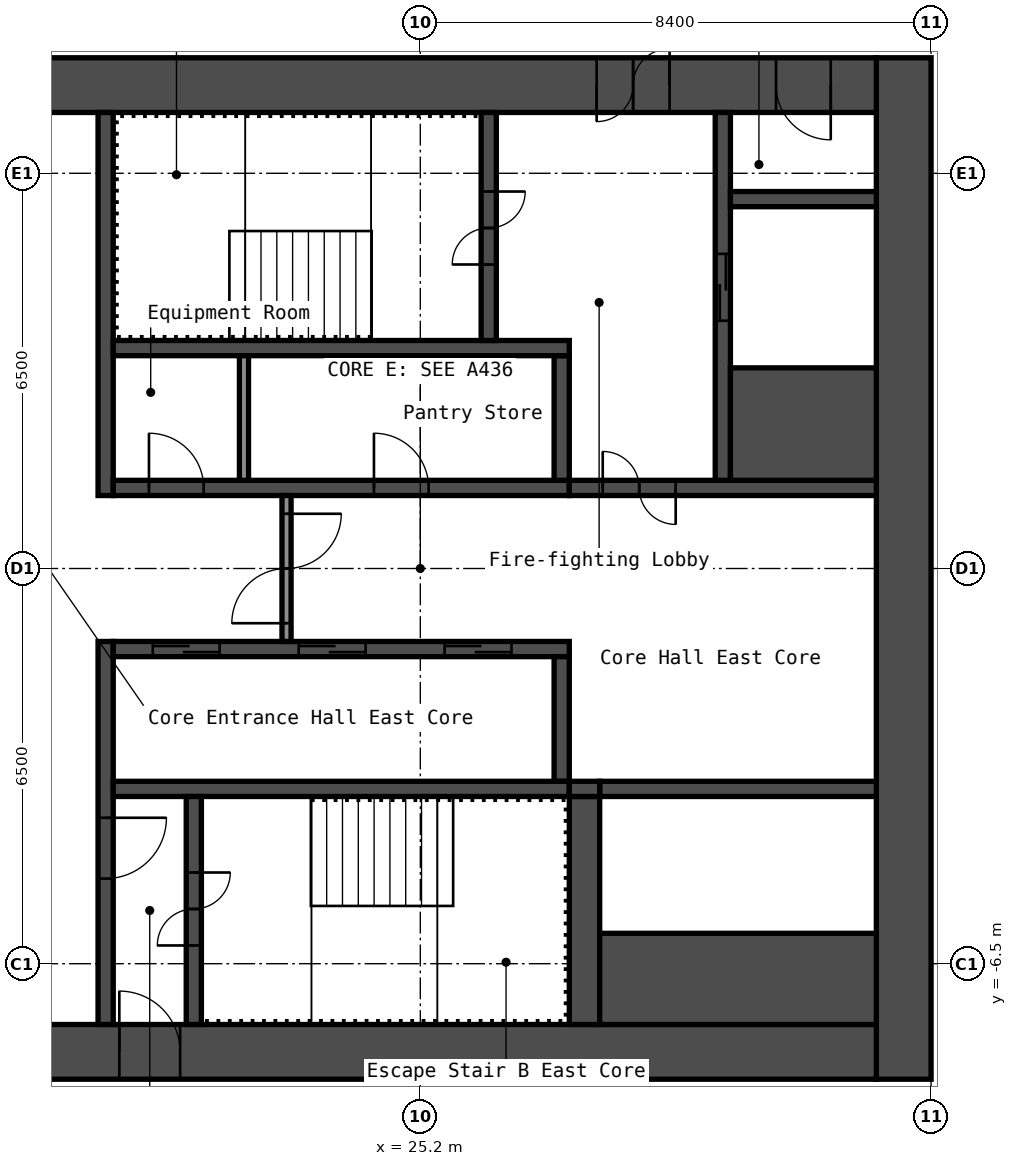
"""IFC4 building model, lengths in metres.
Left out: names, types, materials, properties, quantities, classifications, styles, units other than length and angle.
Written with IfcOpenShell. Run it as: python <this file> out.ifc"""

import sys

from ifc_helpers import new_model, si_unit, direction, frame, frame_2d, origin, place, context, subcontext, project, spatial, rectangle, extrude, element, fill, save


model = new_model("IFC4")
c1 = context("Model", 3, precision=1e-05, world=origin(), true_north=direction((0.0, 1.0)))
c2 = subcontext(c1, "Body", "Model", "MODEL_VIEW")
j1 = project(units=[si_unit("LENGTHUNIT", "METRE"), si_unit("PLANEANGLEUNIT", "RADIAN")], contexts=[c1])
p1 = place(None, origin())
s1 = spatial("IfcSite", under=j1, at=p1, CompositionType="ELEMENT")
p2 = place(p1, origin())
s2 = spatial("IfcBuilding", under=s1, at=p2, CompositionType="ELEMENT")
p3 = place(p2, frame((0.0, 0.0, 248.6)))
s3 = spatial("IfcBuildingStorey", under=s2, at=p3, CompositionType="ELEMENT", Elevation=248.6)
p4 = place(p3, frame((33.15, -8.4, 0.0), z_axis=(0.0, 0.0, 1.0), x_axis=(0.0, 1.0, 0.0)))
e1 = element("IfcWall", 1, at=p4, inside=s3, PredefinedType="SHEAR", context=c2, shape_type="SweptSolid", body=[
    extrude(rectangle(XDim=16.8, YDim=0.9, at=frame_2d((8.4, 0.0))), origin(), (0.0, 0.0, 1.0), 2.75),
])
p5 = place(p3, frame((17.7, 7.95, 0.0), z_axis=(0.0, 0.0, 1.0), x_axis=(1.0, 0.0, 0.0)))
e2 = element("IfcWall", 2, at=p5, inside=s3, PredefinedType="SHEAR", context=c2, shape_type="SweptSolid", body=[
    extrude(rectangle(XDim=15.0, YDim=0.9, at=frame_2d((7.5, 0.0))), origin(), (0.0, 0.0, 1.0), 2.75),
])
p6 = place(p5, frame((10.4, 0.0, 0.0)))
e3 = element("IfcOpeningElement", 3, at=p6, cuts=e2, PredefinedType="OPENING", context=c2, shape_type="SweptSolid", body=[
    extrude(rectangle(XDim=1.2, YDim=2.1, at=frame_2d((0.6, 1.05))), frame((0.0, 0.46, 0.0), z_axis=(0.0, -1.0, 0.0), x_axis=(1.0, 0.0, 0.0)), (0.0, 0.0, 1.0), 0.92),
])
p7 = place(p5, frame((13.35, 0.0, 0.0)))
e4 = element("IfcOpeningElement", 4, at=p7, cuts=e2, PredefinedType="OPENING", context=c2, shape_type="SweptSolid", body=[
    extrude(rectangle(XDim=0.9, YDim=2.1, at=frame_2d((0.45, 1.05))), frame((0.0, 0.46, 0.0), z_axis=(0.0, -1.0, 0.0), x_axis=(1.0, 0.0, 0.0)), (0.0, 0.0, 1.0), 0.92),
])
p8 = place(p3, frame((17.7, -7.95, 0.0), z_axis=(0.0, 0.0, 1.0), x_axis=(1.0, 0.0, 0.0)))
e5 = element("IfcWall", 5, at=p8, inside=s3, PredefinedType="SHEAR", context=c2, shape_type="SweptSolid", body=[
    extrude(rectangle(XDim=15.0, YDim=0.9, at=frame_2d((7.5, 0.0))), origin(), (0.0, 0.0, 1.0), 2.75),
])
p9 = place(p8, frame((2.55, 0.0, 0.0)))
e6 = element("IfcOpeningElement", 6, at=p9, cuts=e5, PredefinedType="OPENING", context=c2, shape_type="SweptSolid", body=[
    extrude(rectangle(XDim=1.0, YDim=2.1, at=frame_2d((0.5, 1.05))), frame((0.0, 0.46, 0.0), z_axis=(0.0, -1.0, 0.0), x_axis=(1.0, 0.0, 0.0)), (0.0, 0.0, 1.0), 0.92),
])
p10 = place(p3, frame((20.025, 1.2, 0.0), z_axis=(0.0, 0.0, 1.0), x_axis=(0.0, 1.0, 0.0)))
e7 = element("IfcWall", 7, at=p10, inside=s3, PredefinedType="SHEAR", context=c2, shape_type="SweptSolid", body=[
    extrude(rectangle(XDim=6.3, YDim=0.25, at=frame_2d((3.15, 0.0))), origin(), (0.0, 0.0, 1.0), 2.75),
])
p11 = place(p3, frame((20.025, -7.5, 0.0), z_axis=(0.0, 0.0, 1.0), x_axis=(0.0, 1.0, 0.0)))
e8 = element("IfcWall", 8, at=p11, inside=s3, PredefinedType="SHEAR", context=c2, shape_type="SweptSolid", body=[
    extrude(rectangle(XDim=6.3, YDim=0.25, at=frame_2d((3.15, 0.0))), origin(), (0.0, 0.0, 1.0), 2.75),
])
p12 = place(p11, frame((2.4, 0.0, 0.0)))
e9 = element("IfcOpeningElement", 9, at=p12, cuts=e8, PredefinedType="OPENING", context=c2, shape_type="SweptSolid", body=[
    extrude(rectangle(XDim=1.0, YDim=2.1, at=frame_2d((0.5, 1.05))), frame((0.0, 0.135, 0.0), z_axis=(0.0, -1.0, 0.0), x_axis=(1.0, 0.0, 0.0)), (0.0, 0.0, 1.0), 0.27),
])
p13 = place(p3, frame((20.15, 1.325, 0.0), z_axis=(0.0, 0.0, 1.0), x_axis=(1.0, 0.0, 0.0)))
e10 = element("IfcWall", 10, at=p13, inside=s3, PredefinedType="SHEAR", context=c2, shape_type="SweptSolid", body=[
    extrude(rectangle(XDim=7.5, YDim=0.25, at=frame_2d((3.75, 0.0))), origin(), (0.0, 0.0, 1.0), 2.75),
])
p14 = place(p13, frame((0.587, 0.0, 0.0)))
e11 = element("IfcOpeningElement", 11, at=p14, cuts=e10, PredefinedType="OPENING", context=c2, shape_type="SweptSolid", body=[
    extrude(rectangle(XDim=0.9, YDim=2.1, at=frame_2d((0.45, 1.05))), frame((0.0, 0.135, 0.0), z_axis=(0.0, -1.0, 0.0), x_axis=(1.0, 0.0, 0.0)), (0.0, 0.0, 1.0), 0.27),
])
p15 = place(p13, frame((4.288, 0.0, 0.0)))
e12 = element("IfcOpeningElement", 12, at=p15, cuts=e10, PredefinedType="OPENING", context=c2, shape_type="SweptSolid", body=[
    extrude(rectangle(XDim=0.9, YDim=2.1, at=frame_2d((0.45, 1.05))), frame((0.0, 0.135, 0.0), z_axis=(0.0, -1.0, 0.0), x_axis=(1.0, 0.0, 0.0)), (0.0, 0.0, 1.0), 0.27),
])
p16 = place(p3, frame((27.525, 1.45, 0.0), z_axis=(0.0, 0.0, 1.0), x_axis=(0.0, 1.0, 0.0)))
e13 = element("IfcWall", 13, at=p16, inside=s3, PredefinedType="SHEAR", context=c2, shape_type="SweptSolid", body=[
    extrude(rectangle(XDim=2.05, YDim=0.25, at=frame_2d((1.025, 0.0))), origin(), (0.0, 0.0, 1.0), 2.75),
])
p17 = place(p3, frame((20.15, 3.625, 0.0), z_axis=(0.0, 0.0, 1.0), x_axis=(1.0, 0.0, 0.0)))
e14 = element("IfcWall", 14, at=p17, inside=s3, PredefinedType="SHEAR", context=c2, shape_type="SweptSolid", body=[
    extrude(rectangle(XDim=7.5, YDim=0.25, at=frame_2d((3.75, 0.0))), origin(), (0.0, 0.0, 1.0), 2.75),
])
p18 = place(p3, frame((26.325, 3.75, 0.0), z_axis=(0.0, 0.0, 1.0), x_axis=(0.0, 1.0, 0.0)))
e15 = element("IfcWall", 15, at=p18, inside=s3, PredefinedType="SHEAR", context=c2, shape_type="SweptSolid", body=[
    extrude(rectangle(XDim=3.75, YDim=0.25, at=frame_2d((1.875, 0.0))), origin(), (0.0, 0.0, 1.0), 2.75),
])
p19 = place(p18, frame((1.25, 0.0, 0.0)))
e16 = element("IfcOpeningElement", 16, at=p19, cuts=e15, PredefinedType="OPENING", context=c2, shape_type="SweptSolid", body=[
    extrude(rectangle(XDim=1.2, YDim=2.1, at=frame_2d((0.6, 1.05))), frame((0.0, 0.135, 0.0), z_axis=(0.0, -1.0, 0.0), x_axis=(1.0, 0.0, 0.0)), (0.0, 0.0, 1.0), 0.27),
])
p20 = place(p3, frame((27.65, 1.325, 0.0), z_axis=(0.0, 0.0, 1.0), x_axis=(1.0, 0.0, 0.0)))
e17 = element("IfcWall", 17, at=p20, inside=s3, PredefinedType="SHEAR", context=c2, shape_type="SweptSolid", body=[
    extrude(rectangle(XDim=5.05, YDim=0.25, at=frame_2d((2.525, 0.0))), origin(), (0.0, 0.0, 1.0), 2.75),
])
p21 = place(p20, frame((0.55, 0.0, 0.0)))
e18 = element("IfcOpeningElement", 18, at=p21, cuts=e17, PredefinedType="OPENING", context=c2, shape_type="SweptSolid", body=[
    extrude(rectangle(XDim=1.2, YDim=2.1, at=frame_2d((0.6, 1.05))), frame((0.0, 0.135, 0.0), z_axis=(0.0, -1.0, 0.0), x_axis=(1.0, 0.0, 0.0)), (0.0, 0.0, 1.0), 0.27),
])
p22 = place(p3, frame((30.175, 1.45, 0.0), z_axis=(0.0, 0.0, 1.0), x_axis=(0.0, 1.0, 0.0)))
e19 = element("IfcWall", 19, at=p22, inside=s3, PredefinedType="SHEAR", context=c2, shape_type="SweptSolid", body=[
    extrude(rectangle(XDim=6.05, YDim=0.25, at=frame_2d((3.025, 0.0))), origin(), (0.0, 0.0, 1.0), 2.75),
])
p23 = place(p22, frame((2.625, 0.0, 0.0)))
e20 = element("IfcOpeningElement", 20, at=p23, cuts=e19, PredefinedType="OPENING", context=c2, shape_type="SweptSolid", body=[
    extrude(rectangle(XDim=1.1, YDim=2.1, at=frame_2d((0.55, 1.05))), frame((0.0, 0.135, 0.0), z_axis=(0.0, -1.0, 0.0), x_axis=(1.0, 0.0, 0.0)), (0.0, 0.0, 1.0), 0.27),
])
p24 = place(p3, frame((30.3, 2.375, 0.0), z_axis=(0.0, 0.0, 1.0), x_axis=(1.0, 0.0, 0.0)))
e21 = element("IfcWall", 21, at=p24, inside=s3, PredefinedType="SHEAR", context=c2, shape_type="SweptSolid", body=[
    extrude(rectangle(XDim=2.4, YDim=1.85, at=frame_2d((1.2, 0.0))), origin(), (0.0, 0.0, 1.0), 2.75),
])
p25 = place(p3, frame((30.3, 6.075, 0.0), z_axis=(0.0, 0.0, 1.0), x_axis=(1.0, 0.0, 0.0)))
e22 = element("IfcWall", 22, at=p25, inside=s3, PredefinedType="SHEAR", context=c2, shape_type="SweptSolid", body=[
    extrude(rectangle(XDim=2.4, YDim=0.25, at=frame_2d((1.2, 0.0))), origin(), (0.0, 0.0, 1.0), 2.75),
])
p26 = place(p3, frame((20.15, -1.325, 0.0), z_axis=(0.0, 0.0, 1.0), x_axis=(1.0, 0.0, 0.0)))
e23 = element("IfcWall", 23, at=p26, inside=s3, PredefinedType="SHEAR", context=c2, shape_type="SweptSolid", body=[
    extrude(rectangle(XDim=7.5, YDim=0.25, at=frame_2d((3.75, 0.0))), origin(), (0.0, 0.0, 1.0), 2.75),
])
p27 = place(p26, frame((0.65, 0.0, 0.0)))
e24 = element("IfcOpeningElement", 24, at=p27, cuts=e23, PredefinedType="OPENING", context=c2, shape_type="SweptSolid", body=[
    extrude(rectangle(XDim=1.1, YDim=2.1, at=frame_2d((0.55, 1.05))), frame((0.0, 0.135, 0.0), z_axis=(0.0, -1.0, 0.0), x_axis=(1.0, 0.0, 0.0)), (0.0, 0.0, 1.0), 0.27),
])
p28 = place(p26, frame((3.05, 0.0, 0.0)))
e25 = element("IfcOpeningElement", 25, at=p28, cuts=e23, PredefinedType="OPENING", context=c2, shape_type="SweptSolid", body=[
    extrude(rectangle(XDim=1.1, YDim=2.1, at=frame_2d((0.55, 1.05))), frame((0.0, 0.135, 0.0), z_axis=(0.0, -1.0, 0.0), x_axis=(1.0, 0.0, 0.0)), (0.0, 0.0, 1.0), 0.27),
])
p29 = place(p26, frame((5.45, 0.0, 0.0)))
e26 = element("IfcOpeningElement", 26, at=p29, cuts=e23, PredefinedType="OPENING", context=c2, shape_type="SweptSolid", body=[
    extrude(rectangle(XDim=1.1, YDim=2.1, at=frame_2d((0.55, 1.05))), frame((0.0, 0.135, 0.0), z_axis=(0.0, -1.0, 0.0), x_axis=(1.0, 0.0, 0.0)), (0.0, 0.0, 1.0), 0.27),
])
p30 = place(p3, frame((27.525, -3.5, 0.0), z_axis=(0.0, 0.0, 1.0), x_axis=(0.0, 1.0, 0.0)))
e27 = element("IfcWall", 27, at=p30, inside=s3, PredefinedType="SHEAR", context=c2, shape_type="SweptSolid", body=[
    extrude(rectangle(XDim=2.05, YDim=0.25, at=frame_2d((1.025, 0.0))), origin(), (0.0, 0.0, 1.0), 2.75),
])
p31 = place(p3, frame((20.15, -3.625, 0.0), z_axis=(0.0, 0.0, 1.0), x_axis=(1.0, 0.0, 0.0)))
e28 = element("IfcWall", 28, at=p31, inside=s3, PredefinedType="SHEAR", context=c2, shape_type="SweptSolid", body=[
    extrude(rectangle(XDim=7.5, YDim=0.25, at=frame_2d((3.75, 0.0))), origin(), (0.0, 0.0, 1.0), 2.75),
])
p32 = place(p3, frame((21.475, -7.5, 0.0), z_axis=(0.0, 0.0, 1.0), x_axis=(0.0, 1.0, 0.0)))
e29 = element("IfcWall", 29, at=p32, inside=s3, PredefinedType="SHEAR", context=c2, shape_type="SweptSolid", body=[
    extrude(rectangle(XDim=3.75, YDim=0.25, at=frame_2d((1.875, 0.0))), origin(), (0.0, 0.0, 1.0), 2.75),
])
p33 = place(p32, frame((1.3, 0.0, 0.0)))
e30 = element("IfcOpeningElement", 30, at=p33, cuts=e29, PredefinedType="OPENING", context=c2, shape_type="SweptSolid", body=[
    extrude(rectangle(XDim=1.2, YDim=2.1, at=frame_2d((0.6, 1.05))), frame((0.0, 0.135, 0.0), z_axis=(0.0, -1.0, 0.0), x_axis=(1.0, 0.0, 0.0)), (0.0, 0.0, 1.0), 0.27),
])
p34 = place(p3, frame((27.9, -7.5, 0.0), z_axis=(0.0, 0.0, 1.0), x_axis=(0.0, 1.0, 0.0)))
e31 = element("IfcWall", 31, at=p34, inside=s3, PredefinedType="SHEAR", context=c2, shape_type="SweptSolid", body=[
    extrude(rectangle(XDim=3.75, YDim=0.5, at=frame_2d((1.875, 0.0))), origin(), (0.0, 0.0, 1.0), 2.75),
])
p35 = place(p3, frame((28.15, -3.625, 0.0), z_axis=(0.0, 0.0, 1.0), x_axis=(1.0, 0.0, 0.0)))
e32 = element("IfcWall", 32, at=p35, inside=s3, PredefinedType="SHEAR", context=c2, shape_type="SweptSolid", body=[
    extrude(rectangle(XDim=4.55, YDim=0.25, at=frame_2d((2.275, 0.0))), origin(), (0.0, 0.0, 1.0), 2.75),
])
p36 = place(p3, frame((28.15, -6.75, 0.0), z_axis=(0.0, 0.0, 1.0), x_axis=(1.0, 0.0, 0.0)))
e33 = element("IfcWall", 33, at=p36, inside=s3, PredefinedType="SHEAR", context=c2, shape_type="SweptSolid", body=[
    extrude(rectangle(XDim=4.55, YDim=1.5, at=frame_2d((2.275, 0.0))), origin(), (0.0, 0.0, 1.0), 2.75),
])
p37 = place(p3, frame((27.65, -3.625, 0.0), z_axis=(0.0, 0.0, 1.0), x_axis=(1.0, 0.0, 0.0)))
e34 = element("IfcWall", 34, at=p37, inside=s3, PredefinedType="SHEAR", context=c2, shape_type="SweptSolid", body=[
    extrude(rectangle(XDim=0.5, YDim=0.25, at=frame_2d((0.25, 0.0))), origin(), (0.0, 0.0, 1.0), 2.75),
])
p38 = place(p3, frame((23.0, -1.2, 0.0), z_axis=(0.0, 0.0, 1.0), x_axis=(0.0, 1.0, 0.0)))
e35 = element("IfcWall", 35, at=p38, inside=s3, PredefinedType="PARTITIONING", context=c2, shape_type="SweptSolid", body=[
    extrude(rectangle(XDim=2.4, YDim=0.15, at=frame_2d((1.2, 0.0))), origin(), (0.0, 0.0, 1.0), 2.75),
])
p39 = place(p38, frame((0.3, 0.0, 0.0)))
e36 = element("IfcOpeningElement", 36, at=p39, cuts=e35, PredefinedType="OPENING", context=c2, shape_type="SweptSolid", body=[
    extrude(rectangle(XDim=1.8, YDim=2.1, at=frame_2d((0.9, 1.05))), frame((0.0, 0.085, 0.0), z_axis=(0.0, -1.0, 0.0), x_axis=(1.0, 0.0, 0.0)), (0.0, 0.0, 1.0), 0.17),
])
p40 = place(p3, frame((22.3, 1.45, 0.0), z_axis=(0.0, 0.0, 1.0), x_axis=(0.0, 1.0, 0.0)))
e37 = element("IfcWall", 37, at=p40, inside=s3, PredefinedType="PARTITIONING", context=c2, shape_type="SweptSolid", body=[
    extrude(rectangle(XDim=2.05, YDim=0.15, at=frame_2d((1.025, 0.0))), origin(), (0.0, 0.0, 1.0), 2.75),
])
p41 = place(p6, origin())
e38 = element("IfcDoor", 38, at=p41, inside=s3, OperationType="DOUBLE_DOOR_SINGLE_SWING", PredefinedType="DOOR", context=c2, shape_type="SweptSolid", body=[
    extrude(rectangle(XDim=1.2, YDim=2.1, at=frame_2d((0.6, 1.05))), frame((0.0, 0.025, 0.0), z_axis=(0.0, -1.0, 0.0), x_axis=(1.0, 0.0, 0.0)), (0.0, 0.0, 1.0), 0.05),
])
fill(e3, e38)
p42 = place(p7, origin())
e39 = element("IfcDoor", 39, at=p42, inside=s3, OperationType="SINGLE_SWING_RIGHT", PredefinedType="DOOR", context=c2, shape_type="SweptSolid", body=[
    extrude(rectangle(XDim=0.9, YDim=2.1, at=frame_2d((0.45, 1.05))), frame((0.0, 0.025, 0.0), z_axis=(0.0, -1.0, 0.0), x_axis=(1.0, 0.0, 0.0)), (0.0, 0.0, 1.0), 0.05),
])
fill(e4, e39)
p43 = place(p9, origin())
e40 = element("IfcDoor", 40, at=p43, inside=s3, OperationType="SINGLE_SWING_RIGHT", PredefinedType="DOOR", context=c2, shape_type="SweptSolid", body=[
    extrude(rectangle(XDim=1.0, YDim=2.1, at=frame_2d((0.5, 1.05))), frame((0.0, 0.025, 0.0), z_axis=(0.0, -1.0, 0.0), x_axis=(1.0, 0.0, 0.0)), (0.0, 0.0, 1.0), 0.05),
])
fill(e6, e40)
p44 = place(p19, origin())
e41 = element("IfcDoor", 41, at=p44, inside=s3, OperationType="DOUBLE_DOOR_SINGLE_SWING", PredefinedType="DOOR", context=c2, shape_type="SweptSolid", body=[
    extrude(rectangle(XDim=1.2, YDim=2.1, at=frame_2d((0.6, 1.05))), frame((0.0, 0.025, 0.0), z_axis=(0.0, -1.0, 0.0), x_axis=(1.0, 0.0, 0.0)), (0.0, 0.0, 1.0), 0.05),
])
fill(e16, e41)
p45 = place(p33, origin())
e42 = element("IfcDoor", 42, at=p45, inside=s3, OperationType="DOUBLE_DOOR_SINGLE_SWING", PredefinedType="DOOR", context=c2, shape_type="SweptSolid", body=[
    extrude(rectangle(XDim=1.2, YDim=2.1, at=frame_2d((0.6, 1.05))), frame((0.0, 0.025, 0.0), z_axis=(0.0, -1.0, 0.0), x_axis=(1.0, 0.0, 0.0)), (0.0, 0.0, 1.0), 0.05),
])
fill(e30, e42)
p46 = place(p12, origin())
e43 = element("IfcDoor", 43, at=p46, inside=s3, OperationType="SINGLE_SWING_RIGHT", PredefinedType="DOOR", context=c2, shape_type="SweptSolid", body=[
    extrude(rectangle(XDim=1.0, YDim=2.1, at=frame_2d((0.5, 1.05))), frame((0.0, 0.025, 0.0), z_axis=(0.0, -1.0, 0.0), x_axis=(1.0, 0.0, 0.0)), (0.0, 0.0, 1.0), 0.05),
])
fill(e9, e43)
p47 = place(p21, origin())
e44 = element("IfcDoor", 44, at=p47, inside=s3, OperationType="DOUBLE_DOOR_SINGLE_SWING", PredefinedType="DOOR", context=c2, shape_type="SweptSolid", body=[
    extrude(rectangle(XDim=1.2, YDim=2.1, at=frame_2d((0.6, 1.05))), frame((0.0, 0.025, 0.0), z_axis=(0.0, -1.0, 0.0), x_axis=(1.0, 0.0, 0.0)), (0.0, 0.0, 1.0), 0.05),
])
fill(e18, e44)
p48 = place(p39, origin())
e45 = element("IfcDoor", 45, at=p48, inside=s3, OperationType="DOUBLE_DOOR_SINGLE_SWING", PredefinedType="DOOR", context=c2, shape_type="SweptSolid", body=[
    extrude(rectangle(XDim=1.8, YDim=2.1, at=frame_2d((0.9, 1.05))), frame((0.0, 0.025, 0.0), z_axis=(0.0, -1.0, 0.0), x_axis=(1.0, 0.0, 0.0)), (0.0, 0.0, 1.0), 0.05),
])
fill(e36, e45)
p49 = place(p14, origin())
e46 = element("IfcDoor", 46, at=p49, inside=s3, OperationType="SINGLE_SWING_RIGHT", PredefinedType="DOOR", context=c2, shape_type="SweptSolid", body=[
    extrude(rectangle(XDim=0.9, YDim=2.1, at=frame_2d((0.45, 1.05))), frame((0.0, 0.025, 0.0), z_axis=(0.0, -1.0, 0.0), x_axis=(1.0, 0.0, 0.0)), (0.0, 0.0, 1.0), 0.05),
])
fill(e11, e46)
p50 = place(p15, origin())
e47 = element("IfcDoor", 47, at=p50, inside=s3, OperationType="SINGLE_SWING_RIGHT", PredefinedType="DOOR", context=c2, shape_type="SweptSolid", body=[
    extrude(rectangle(XDim=0.9, YDim=2.1, at=frame_2d((0.45, 1.05))), frame((0.0, 0.025, 0.0), z_axis=(0.0, -1.0, 0.0), x_axis=(1.0, 0.0, 0.0)), (0.0, 0.0, 1.0), 0.05),
])
fill(e12, e47)
p51 = place(p27, origin())
e48 = element("IfcDoor", 48, at=p51, inside=s3, OperationType="DOUBLE_DOOR_SLIDING", PredefinedType="DOOR", context=c2, shape_type="SweptSolid", body=[
    extrude(rectangle(XDim=1.1, YDim=2.1, at=frame_2d((0.55, 1.05))), frame((0.0, 0.025, 0.0), z_axis=(0.0, -1.0, 0.0), x_axis=(1.0, 0.0, 0.0)), (0.0, 0.0, 1.0), 0.05),
])
fill(e24, e48)
p52 = place(p28, origin())
e49 = element("IfcDoor", 49, at=p52, inside=s3, OperationType="DOUBLE_DOOR_SLIDING", PredefinedType="DOOR", context=c2, shape_type="SweptSolid", body=[
    extrude(rectangle(XDim=1.1, YDim=2.1, at=frame_2d((0.55, 1.05))), frame((0.0, 0.025, 0.0), z_axis=(0.0, -1.0, 0.0), x_axis=(1.0, 0.0, 0.0)), (0.0, 0.0, 1.0), 0.05),
])
fill(e25, e49)
p53 = place(p29, origin())
e50 = element("IfcDoor", 50, at=p53, inside=s3, OperationType="DOUBLE_DOOR_SLIDING", PredefinedType="DOOR", context=c2, shape_type="SweptSolid", body=[
    extrude(rectangle(XDim=1.1, YDim=2.1, at=frame_2d((0.55, 1.05))), frame((0.0, 0.025, 0.0), z_axis=(0.0, -1.0, 0.0), x_axis=(1.0, 0.0, 0.0)), (0.0, 0.0, 1.0), 0.05),
])
fill(e26, e50)
p54 = place(p23, origin())
e51 = element("IfcDoor", 51, at=p54, inside=s3, OperationType="DOUBLE_DOOR_SLIDING", PredefinedType="DOOR", context=c2, shape_type="SweptSolid", body=[
    extrude(rectangle(XDim=1.1, YDim=2.1, at=frame_2d((0.55, 1.05))), frame((0.0, 0.025, 0.0), z_axis=(0.0, -1.0, 0.0), x_axis=(1.0, 0.0, 0.0)), (0.0, 0.0, 1.0), 0.05),
])
fill(e20, e51)
save(model, sys.argv[1])
